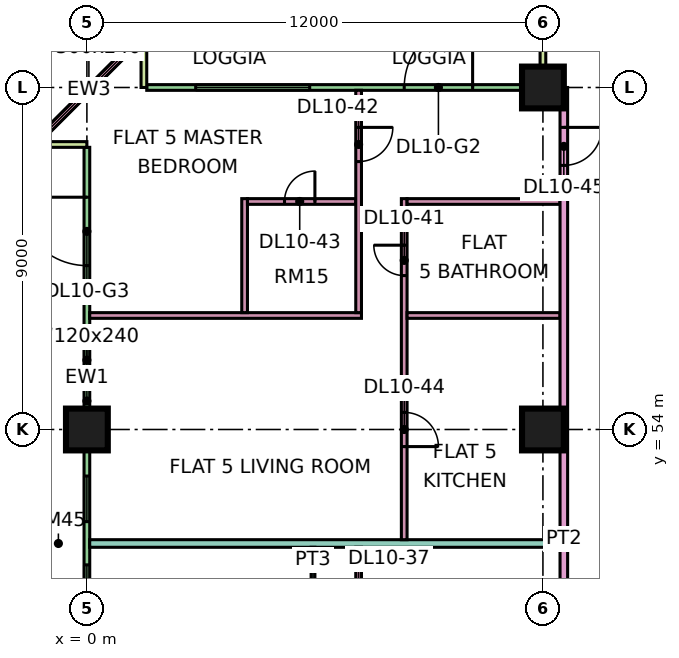
"""IFC4 building model, lengths in metres.
Left out: names, types, materials, properties, quantities, classifications, styles, units other than length and angle.
Written with IfcOpenShell. Run it as: python <this file> out.ifc"""

import sys

from ifc_helpers import new_model, si_unit, direction, frame, frame_2d, origin, origin_2d, place, context, subcontext, project, spatial, rectangle, extrude, element, fill, save


model = new_model("IFC4")
c1 = context("Model", 3, precision=1e-05, world=origin(), true_north=direction((0.0, 1.0)))
c2 = subcontext(c1, "Body", "Model", "MODEL_VIEW")
j1 = project(units=[si_unit("LENGTHUNIT", "METRE"), si_unit("PLANEANGLEUNIT", "RADIAN")], contexts=[c1])
p1 = place(None, origin())
s1 = spatial("IfcSite", under=j1, at=p1, CompositionType="ELEMENT")
p2 = place(p1, origin())
s2 = spatial("IfcBuilding", under=s1, at=p2, CompositionType="ELEMENT")
p3 = place(p2, frame((0.0, 0.0, 52.65)))
s3 = spatial("IfcBuildingStorey", under=s2, at=p3, CompositionType="ELEMENT", Elevation=52.65)
for number, where, z_axis, x_axis in (
    (1, (0.0, 54.0, 0.0), (0.0, 0.0, 1.0), (1.0, 0.0, 0.0)),
    (2, (12.0, 54.0, 0.0), (0.0, 0.0, 1.0), (1.0, 0.0, 0.0)),
    (3, (12.0, 63.0, 0.0), (0.0, 0.0, 1.0), (1.0, 0.0, 0.0)),
):
    element("IfcColumn", number, at=place(p3, frame(where, z_axis=z_axis, x_axis=x_axis)), inside=s3, PredefinedType="COLUMN", context=c2, shape_type="SweptSolid", body=[
        extrude(rectangle(XDim=1.1, YDim=1.1, at=origin_2d()), origin(), (0.0, 0.0, 1.0), 3.75),
    ])
p4 = place(p3, frame((11.925, 63.0, 0.0), z_axis=(0.0, 0.0, 1.0), x_axis=(-1.0, 0.0, 0.0)))
e4 = element("IfcWall", 4, at=p4, inside=s3, PredefinedType="SOLIDWALL", context=c2, shape_type="SweptSolid", body=[
    extrude(rectangle(XDim=10.35, YDim=0.15, at=frame_2d((5.175, 0.0))), origin(), (0.0, 0.0, 1.0), 3.35),
])
p5 = place(p4, frame((1.775, 0.0, 0.0)))
e5 = element("IfcOpeningElement", 5, at=p5, cuts=e4, PredefinedType="OPENING", context=c2, shape_type="SweptSolid", body=[
    extrude(rectangle(XDim=1.8, YDim=2.4, at=frame_2d((0.9, 1.2))), frame((0.0, 0.085, 0.0), z_axis=(0.0, -1.0, 0.0), x_axis=(1.0, 0.0, 0.0)), (0.0, 0.0, 1.0), 0.17),
])
p6 = place(p4, frame((6.062, 0.0, 0.45)))
e6 = element("IfcOpeningElement", 6, at=p6, cuts=e4, PredefinedType="OPENING", context=c2, shape_type="SweptSolid", body=[
    extrude(rectangle(XDim=3.0, YDim=2.4, at=frame_2d((1.5, 1.2))), frame((0.0, 0.085, 0.0), z_axis=(0.0, -1.0, 0.0), x_axis=(1.0, 0.0, 0.0)), (0.0, 0.0, 1.0), 0.17),
])
for number, where, z_axis, x_axis in (
    (7, (12.0, 64.5, 0.0), (0.0, 0.0, 1.0), (0.0, -1.0, 0.0)),
    (8, (1.5, 64.5, 0.0), (0.0, 0.0, 1.0), (0.0, -1.0, 0.0)),
):
    element("IfcWall", number, at=place(p3, frame(where, z_axis=z_axis, x_axis=x_axis)), inside=s3, PredefinedType="SOLIDWALL", context=c2, shape_type="SweptSolid", body=[
        extrude(rectangle(XDim=1.5, YDim=0.15, at=frame_2d((0.75, 0.0))), origin(), (0.0, 0.0, 1.0), 3.35),
    ])
p7 = place(p3, frame((1.553, 64.447, 0.0), z_axis=(0.0, 0.0, 1.0), x_axis=(-0.707106781187, -0.707106781187, 0.0)))
e9 = element("IfcWall", 9, at=p7, inside=s3, PredefinedType="SOLIDWALL", context=c2, shape_type="SweptSolid", body=[
    extrude(rectangle(XDim=4.243, YDim=0.15, at=frame_2d((2.121, 0.0))), origin(), (0.0, 0.0, 1.0), 3.35),
])
p8 = place(p7, frame((0.621, 0.0, 0.45)))
e10 = element("IfcOpeningElement", 10, at=p8, cuts=e9, PredefinedType="OPENING", context=c2, shape_type="SweptSolid", body=[
    extrude(rectangle(XDim=3.0, YDim=2.4, at=frame_2d((1.5, 1.2))), frame((0.0, 0.085, 0.0), z_axis=(0.0, -1.0, 0.0), x_axis=(1.0, 0.0, 0.0)), (0.0, 0.0, 1.0), 0.17),
])
p9 = place(p3, frame((0.0, 61.425, 0.0), z_axis=(0.0, 0.0, 1.0), x_axis=(0.0, -1.0, 0.0)))
e11 = element("IfcWall", 11, at=p9, inside=s3, PredefinedType="SOLIDWALL", context=c2, shape_type="SweptSolid", body=[
    extrude(rectangle(XDim=13.35, YDim=0.15, at=frame_2d((6.675, 0.0))), origin(), (0.0, 0.0, 1.0), 3.35),
])
p10 = place(p9, frame((1.312, 0.0, 0.0)))
e12 = element("IfcOpeningElement", 12, at=p10, cuts=e11, PredefinedType="OPENING", context=c2, shape_type="SweptSolid", body=[
    extrude(rectangle(XDim=1.8, YDim=2.4, at=frame_2d((0.9, 1.2))), frame((0.0, 0.085, 0.0), z_axis=(0.0, -1.0, 0.0), x_axis=(1.0, 0.0, 0.0)), (0.0, 0.0, 1.0), 0.17),
])
p11 = place(p9, frame((5.0, 0.0, 0.45)))
e13 = element("IfcOpeningElement", 13, at=p11, cuts=e11, PredefinedType="OPENING", context=c2, shape_type="SweptSolid", body=[
    extrude(rectangle(XDim=1.2, YDim=2.4, at=frame_2d((0.6, 1.2))), frame((0.0, 0.085, 0.0), z_axis=(0.0, -1.0, 0.0), x_axis=(1.0, 0.0, 0.0)), (0.0, 0.0, 1.0), 0.17),
])
p12 = place(p9, frame((8.65, 0.0, 0.45)))
e14 = element("IfcOpeningElement", 14, at=p12, cuts=e11, PredefinedType="OPENING", context=c2, shape_type="SweptSolid", body=[
    extrude(rectangle(XDim=1.2, YDim=2.4, at=frame_2d((0.6, 1.2))), frame((0.0, 0.085, 0.0), z_axis=(0.0, -1.0, 0.0), x_axis=(1.0, 0.0, 0.0)), (0.0, 0.0, 1.0), 0.17),
])
p13 = place(p9, frame((10.988, 0.0, 0.45)))
e15 = element("IfcOpeningElement", 15, at=p13, cuts=e11, PredefinedType="OPENING", context=c2, shape_type="SweptSolid", body=[
    extrude(rectangle(XDim=1.8, YDim=2.4, at=frame_2d((0.9, 1.2))), frame((0.0, 0.085, 0.0), z_axis=(0.0, -1.0, 0.0), x_axis=(1.0, 0.0, 0.0)), (0.0, 0.0, 1.0), 0.17),
])
p14 = place(p3, frame((-1.5, 61.5, 0.0), z_axis=(0.0, 0.0, 1.0), x_axis=(1.0, 0.0, 0.0)))
e16 = element("IfcWall", 16, at=p14, inside=s3, PredefinedType="SOLIDWALL", context=c2, shape_type="SweptSolid", body=[
    extrude(rectangle(XDim=1.5, YDim=0.15, at=frame_2d((0.75, 0.0))), origin(), (0.0, 0.0, 1.0), 3.35),
])
p15 = place(p3, frame((0.074, 51.0, 0.0), z_axis=(0.0, 0.0, 1.0), x_axis=(1.0, 0.0, 0.0)))
e17 = element("IfcWall", 17, at=p15, inside=s3, PredefinedType="PARTITIONING", context=c2, shape_type="SweptSolid", body=[
    extrude(rectangle(XDim=12.376, YDim=0.2, at=frame_2d((6.188, 0.0))), origin(), (0.0, 0.0, 1.0), 3.35),
])
p16 = place(p3, frame((0.074, 57.0, 0.0), z_axis=(0.0, 0.0, 1.0), x_axis=(1.0, 0.0, 0.0)))
e18 = element("IfcWall", 18, at=p16, inside=s3, PredefinedType="PARTITIONING", context=c2, shape_type="SweptSolid", body=[
    extrude(rectangle(XDim=7.151, YDim=0.15, at=frame_2d((3.576, 0.0))), origin(), (0.0, 0.0, 1.0), 3.35),
])
p17 = place(p3, frame((4.15, 57.075, 0.0), z_axis=(0.0, 0.0, 1.0), x_axis=(0.0, 1.0, 0.0)))
e19 = element("IfcWall", 19, at=p17, inside=s3, PredefinedType="PARTITIONING", context=c2, shape_type="SweptSolid", body=[
    extrude(rectangle(XDim=3.0, YDim=0.15, at=frame_2d((1.5, 0.0))), origin(), (0.0, 0.0, 1.0), 3.35),
])
p18 = place(p3, frame((4.225, 60.0, 0.0), z_axis=(0.0, 0.0, 1.0), x_axis=(1.0, 0.0, 0.0)))
e20 = element("IfcWall", 20, at=p18, inside=s3, PredefinedType="PARTITIONING", context=c2, shape_type="SweptSolid", body=[
    extrude(rectangle(XDim=2.85, YDim=0.15, at=frame_2d((1.425, 0.0))), origin(), (0.0, 0.0, 1.0), 3.35),
])
p19 = place(p18, frame((0.975, 0.0, 0.0)))
e21 = element("IfcOpeningElement", 21, at=p19, cuts=e20, PredefinedType="OPENING", context=c2, shape_type="SweptSolid", body=[
    extrude(rectangle(XDim=0.8, YDim=2.1, at=frame_2d((0.4, 1.05))), frame((0.0, 0.085, 0.0), z_axis=(0.0, -1.0, 0.0), x_axis=(1.0, 0.0, 0.0)), (0.0, 0.0, 1.0), 0.17),
])
p20 = place(p3, frame((5.95, 48.05, 0.0), z_axis=(0.0, 0.0, 1.0), x_axis=(0.0, 1.0, 0.0)))
e22 = element("IfcWall", 22, at=p20, inside=s3, PredefinedType="PARTITIONING", context=c2, shape_type="SweptSolid", body=[
    extrude(rectangle(XDim=2.85, YDim=0.1, at=frame_2d((1.425, 0.0))), origin(), (0.0, 0.0, 1.0), 3.35),
])
p21 = place(p20, frame((1.0, 0.0, 0.0)))
e23 = element("IfcOpeningElement", 23, at=p21, cuts=e22, PredefinedType="OPENING", context=c2, shape_type="SweptSolid", body=[
    extrude(rectangle(XDim=0.9, YDim=2.1, at=frame_2d((0.45, 1.05))), frame((0.0, 0.06, 0.0), z_axis=(0.0, -1.0, 0.0), x_axis=(1.0, 0.0, 0.0)), (0.0, 0.0, 1.0), 0.12),
])
p22 = place(p3, frame((7.15, 44.325, 0.0), z_axis=(0.0, 0.0, 1.0), x_axis=(0.0, 1.0, 0.0)))
e24 = element("IfcWall", 24, at=p22, inside=s3, PredefinedType="PARTITIONING", context=c2, shape_type="SweptSolid", body=[
    extrude(rectangle(XDim=6.575, YDim=0.15, at=frame_2d((3.288, 0.0))), origin(), (0.0, 0.0, 1.0), 3.35),
])
p23 = place(p22, frame((4.425, 0.0, 0.0)))
e25 = element("IfcOpeningElement", 25, at=p23, cuts=e24, PredefinedType="OPENING", context=c2, shape_type="SweptSolid", body=[
    extrude(rectangle(XDim=0.9, YDim=2.1, at=frame_2d((0.45, 1.05))), frame((0.0, 0.085, 0.0), z_axis=(0.0, -1.0, 0.0), x_axis=(1.0, 0.0, 0.0)), (0.0, 0.0, 1.0), 0.17),
])
p24 = place(p22, frame((1.125, 0.0, 0.0)))
e26 = element("IfcOpeningElement", 26, at=p24, cuts=e24, PredefinedType="OPENING", context=c2, shape_type="SweptSolid", body=[
    extrude(rectangle(XDim=0.8, YDim=2.1, at=frame_2d((0.4, 1.05))), frame((0.0, 0.085, 0.0), z_axis=(0.0, -1.0, 0.0), x_axis=(1.0, 0.0, 0.0)), (0.0, 0.0, 1.0), 0.17),
])
p25 = place(p3, frame((7.15, 57.075, 0.0), z_axis=(0.0, 0.0, 1.0), x_axis=(0.0, 1.0, 0.0)))
e27 = element("IfcWall", 27, at=p25, inside=s3, PredefinedType="PARTITIONING", context=c2, shape_type="SweptSolid", body=[
    extrude(rectangle(XDim=5.851, YDim=0.15, at=frame_2d((2.926, 0.0))), origin(), (0.0, 0.0, 1.0), 3.35),
])
p26 = place(p25, frame((3.975, 0.0, 0.0)))
e28 = element("IfcOpeningElement", 28, at=p26, cuts=e27, PredefinedType="OPENING", context=c2, shape_type="SweptSolid", body=[
    extrude(rectangle(XDim=0.9, YDim=2.1, at=frame_2d((0.45, 1.05))), frame((0.0, 0.085, 0.0), z_axis=(0.0, -1.0, 0.0), x_axis=(1.0, 0.0, 0.0)), (0.0, 0.0, 1.0), 0.17),
])
p27 = place(p3, frame((8.35, 51.1, 0.0), z_axis=(0.0, 0.0, 1.0), x_axis=(0.0, 1.0, 0.0)))
e29 = element("IfcWall", 29, at=p27, inside=s3, PredefinedType="PARTITIONING", context=c2, shape_type="SweptSolid", body=[
    extrude(rectangle(XDim=8.975, YDim=0.15, at=frame_2d((4.487, 0.0))), origin(), (0.0, 0.0, 1.0), 3.35),
])
p28 = place(p27, frame((6.95, 0.0, 0.0)))
e30 = element("IfcOpeningElement", 30, at=p28, cuts=e29, PredefinedType="OPENING", context=c2, shape_type="SweptSolid", body=[
    extrude(rectangle(XDim=0.8, YDim=2.1, at=frame_2d((0.4, 1.05))), frame((0.0, 0.085, 0.0), z_axis=(0.0, -1.0, 0.0), x_axis=(1.0, 0.0, 0.0)), (0.0, 0.0, 1.0), 0.17),
])
p29 = place(p27, frame((2.45, 0.0, 0.0)))
e31 = element("IfcOpeningElement", 31, at=p29, cuts=e29, PredefinedType="OPENING", context=c2, shape_type="SweptSolid", body=[
    extrude(rectangle(XDim=0.9, YDim=2.1, at=frame_2d((0.45, 1.05))), frame((0.0, 0.085, 0.0), z_axis=(0.0, -1.0, 0.0), x_axis=(1.0, 0.0, 0.0)), (0.0, 0.0, 1.0), 0.17),
])
for number, where, z_axis, x_axis in (
    (32, (8.425, 57.0, 0.0), (0.0, 0.0, 1.0), (1.0, 0.0, 0.0)),
    (33, (8.425, 60.0, 0.0), (0.0, 0.0, 1.0), (1.0, 0.0, 0.0)),
):
    element("IfcWall", number, at=place(p3, frame(where, z_axis=z_axis, x_axis=x_axis)), inside=s3, PredefinedType="PARTITIONING", context=c2, shape_type="SweptSolid", body=[
        extrude(rectangle(XDim=4.025, YDim=0.15, at=frame_2d((2.012, 0.0))), origin(), (0.0, 0.0, 1.0), 3.35),
    ])
p30 = place(p3, frame((12.55, 39.225, 0.0), z_axis=(0.0, 0.0, 1.0), x_axis=(0.0, 1.0, 0.0)))
e34 = element("IfcWall", 34, at=p30, inside=s3, PredefinedType="PARTITIONING", context=c2, shape_type="SweptSolid", body=[
    extrude(rectangle(XDim=23.775, YDim=0.2, at=frame_2d((11.887, 0.0))), origin(), (0.0, 0.0, 1.0), 3.35),
])
p31 = place(p30, frame((3.725, 0.0, 0.0)))
e35 = element("IfcOpeningElement", 35, at=p31, cuts=e34, PredefinedType="OPENING", context=c2, shape_type="SweptSolid", body=[
    extrude(rectangle(XDim=1.0, YDim=2.1, at=frame_2d((0.5, 1.05))), frame((0.0, 0.11, 0.0), z_axis=(0.0, -1.0, 0.0), x_axis=(1.0, 0.0, 0.0)), (0.0, 0.0, 1.0), 0.22),
])
p32 = place(p30, frame((21.725, 0.0, 0.0)))
e36 = element("IfcOpeningElement", 36, at=p32, cuts=e34, PredefinedType="OPENING", context=c2, shape_type="SweptSolid", body=[
    extrude(rectangle(XDim=1.0, YDim=2.1, at=frame_2d((0.5, 1.05))), frame((0.0, 0.11, 0.0), z_axis=(0.0, -1.0, 0.0), x_axis=(1.0, 0.0, 0.0)), (0.0, 0.0, 1.0), 0.22),
])
p33 = place(p5, frame((1.8, 0.0, 0.0), z_axis=(0.0, 0.0, 1.0), x_axis=(-1.0, 0.0, 0.0)))
e37 = element("IfcDoor", 37, at=p33, inside=s3, OperationType="DOUBLE_DOOR_SINGLE_SWING", PredefinedType="DOOR", context=c2, shape_type="SweptSolid", body=[
    extrude(rectangle(XDim=1.8, YDim=2.4, at=frame_2d((0.9, 1.2))), frame((0.0, 0.025, 0.0), z_axis=(0.0, -1.0, 0.0), x_axis=(1.0, 0.0, 0.0)), (0.0, 0.0, 1.0), 0.05),
])
fill(e5, e37)
p34 = place(p6, origin())
e38 = element("IfcWindow", 38, at=p34, inside=s3, PartitioningType="SINGLE_PANEL", PredefinedType="WINDOW", context=c2, shape_type="SweptSolid", body=[
    extrude(rectangle(XDim=3.0, YDim=2.4, at=frame_2d((1.5, 1.2))), frame((0.0, 0.03, 0.0), z_axis=(0.0, -1.0, 0.0), x_axis=(1.0, 0.0, 0.0)), (0.0, 0.0, 1.0), 0.06),
])
fill(e6, e38)
p35 = place(p8, origin())
e39 = element("IfcWindow", 39, at=p35, inside=s3, PartitioningType="SINGLE_PANEL", PredefinedType="WINDOW", context=c2, shape_type="SweptSolid", body=[
    extrude(rectangle(XDim=3.0, YDim=2.4, at=frame_2d((1.5, 1.2))), frame((0.0, 0.03, 0.0), z_axis=(0.0, -1.0, 0.0), x_axis=(1.0, 0.0, 0.0)), (0.0, 0.0, 1.0), 0.06),
])
fill(e10, e39)
p36 = place(p10, frame((1.8, 0.0, 0.0), z_axis=(0.0, 0.0, 1.0), x_axis=(-1.0, 0.0, 0.0)))
e40 = element("IfcDoor", 40, at=p36, inside=s3, OperationType="DOUBLE_DOOR_SINGLE_SWING", PredefinedType="DOOR", context=c2, shape_type="SweptSolid", body=[
    extrude(rectangle(XDim=1.8, YDim=2.4, at=frame_2d((0.9, 1.2))), frame((0.0, 0.025, 0.0), z_axis=(0.0, -1.0, 0.0), x_axis=(1.0, 0.0, 0.0)), (0.0, 0.0, 1.0), 0.05),
])
fill(e12, e40)
p37 = place(p11, origin())
e41 = element("IfcWindow", 41, at=p37, inside=s3, PartitioningType="SINGLE_PANEL", PredefinedType="WINDOW", context=c2, shape_type="SweptSolid", body=[
    extrude(rectangle(XDim=1.2, YDim=2.4, at=frame_2d((0.6, 1.2))), frame((0.0, 0.03, 0.0), z_axis=(0.0, -1.0, 0.0), x_axis=(1.0, 0.0, 0.0)), (0.0, 0.0, 1.0), 0.06),
])
fill(e13, e41)
p38 = place(p12, origin())
e42 = element("IfcWindow", 42, at=p38, inside=s3, PartitioningType="SINGLE_PANEL", PredefinedType="WINDOW", context=c2, shape_type="SweptSolid", body=[
    extrude(rectangle(XDim=1.2, YDim=2.4, at=frame_2d((0.6, 1.2))), frame((0.0, 0.03, 0.0), z_axis=(0.0, -1.0, 0.0), x_axis=(1.0, 0.0, 0.0)), (0.0, 0.0, 1.0), 0.06),
])
fill(e14, e42)
p39 = place(p13, origin())
e43 = element("IfcWindow", 43, at=p39, inside=s3, PartitioningType="SINGLE_PANEL", PredefinedType="WINDOW", context=c2, shape_type="SweptSolid", body=[
    extrude(rectangle(XDim=1.8, YDim=2.4, at=frame_2d((0.9, 1.2))), frame((0.0, 0.03, 0.0), z_axis=(0.0, -1.0, 0.0), x_axis=(1.0, 0.0, 0.0)), (0.0, 0.0, 1.0), 0.06),
])
fill(e15, e43)
p40 = place(p28, frame((0.8, 0.0, 0.0), z_axis=(0.0, 0.0, 1.0), x_axis=(-1.0, 0.0, 0.0)))
e44 = element("IfcDoor", 44, at=p40, inside=s3, OperationType="SINGLE_SWING_RIGHT", PredefinedType="DOOR", context=c2, shape_type="SweptSolid", body=[
    extrude(rectangle(XDim=0.8, YDim=2.1, at=frame_2d((0.4, 1.05))), frame((0.0, 0.025, 0.0), z_axis=(0.0, -1.0, 0.0), x_axis=(1.0, 0.0, 0.0)), (0.0, 0.0, 1.0), 0.05),
])
fill(e30, e44)
p41 = place(p26, origin())
e45 = element("IfcDoor", 45, at=p41, inside=s3, OperationType="SINGLE_SWING_RIGHT", PredefinedType="DOOR", context=c2, shape_type="SweptSolid", body=[
    extrude(rectangle(XDim=0.9, YDim=2.1, at=frame_2d((0.45, 1.05))), frame((0.0, 0.025, 0.0), z_axis=(0.0, -1.0, 0.0), x_axis=(1.0, 0.0, 0.0)), (0.0, 0.0, 1.0), 0.05),
])
fill(e28, e45)
p42 = place(p19, frame((0.8, 0.0, 0.0), z_axis=(0.0, 0.0, 1.0), x_axis=(-1.0, 0.0, 0.0)))
e46 = element("IfcDoor", 46, at=p42, inside=s3, OperationType="SINGLE_SWING_RIGHT", PredefinedType="DOOR", context=c2, shape_type="SweptSolid", body=[
    extrude(rectangle(XDim=0.8, YDim=2.1, at=frame_2d((0.4, 1.05))), frame((0.0, 0.025, 0.0), z_axis=(0.0, -1.0, 0.0), x_axis=(1.0, 0.0, 0.0)), (0.0, 0.0, 1.0), 0.05),
])
fill(e21, e46)
p43 = place(p29, frame((0.9, 0.0, 0.0), z_axis=(0.0, 0.0, 1.0), x_axis=(-1.0, 0.0, 0.0)))
e47 = element("IfcDoor", 47, at=p43, inside=s3, OperationType="SINGLE_SWING_LEFT", PredefinedType="DOOR", context=c2, shape_type="SweptSolid", body=[
    extrude(rectangle(XDim=0.9, YDim=2.1, at=frame_2d((0.45, 1.05))), frame((0.0, 0.025, 0.0), z_axis=(0.0, -1.0, 0.0), x_axis=(1.0, 0.0, 0.0)), (0.0, 0.0, 1.0), 0.05),
])
fill(e31, e47)
p44 = place(p32, origin())
e48 = element("IfcDoor", 48, at=p44, inside=s3, OperationType="SINGLE_SWING_RIGHT", PredefinedType="DOOR", context=c2, shape_type="SweptSolid", body=[
    extrude(rectangle(XDim=1.0, YDim=2.1, at=frame_2d((0.5, 1.05))), frame((0.0, 0.025, 0.0), z_axis=(0.0, -1.0, 0.0), x_axis=(1.0, 0.0, 0.0)), (0.0, 0.0, 1.0), 0.05),
])
fill(e36, e48)
save(model, sys.argv[1])
